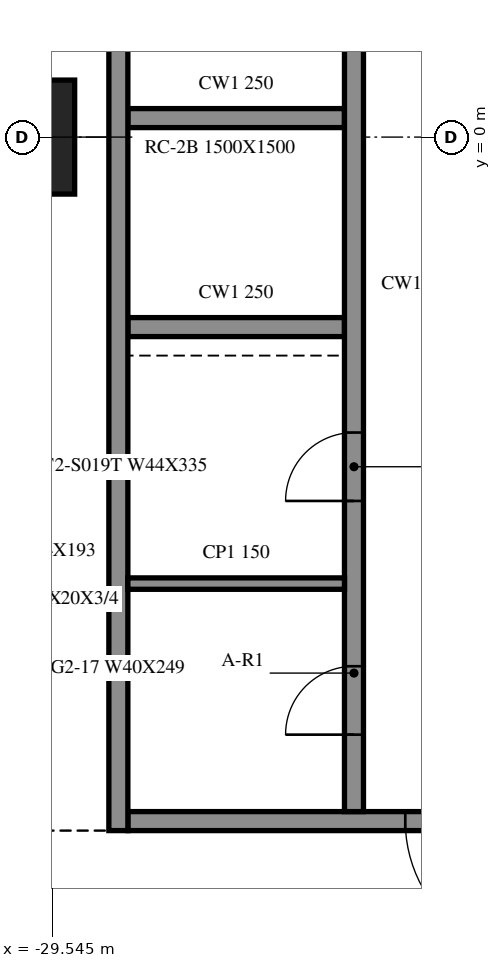
"""IFC4 building model, lengths in metres.
Left out: names, types, materials, properties, quantities, classifications, styles, units other than length and angle.
Written with IfcOpenShell. Run it as: python <this file> out.ifc"""

import sys

from ifc_helpers import new_model, si_unit, direction, frame, frame_2d, origin, origin_2d, place, context, subcontext, project, spatial, rectangle, extrude, element, fill, save


model = new_model("IFC4")
c1 = context("Model", 3, precision=1e-05, world=origin(), true_north=direction((0.0, 1.0)))
c2 = subcontext(c1, "Body", "Model", "MODEL_VIEW")
j1 = project(units=[si_unit("LENGTHUNIT", "METRE"), si_unit("PLANEANGLEUNIT", "RADIAN")], contexts=[c1])
p1 = place(None, origin())
s1 = spatial("IfcSite", under=j1, at=p1, CompositionType="ELEMENT")
p2 = place(p1, origin())
s2 = spatial("IfcBuilding", under=s1, at=p2, CompositionType="ELEMENT")
p3 = place(p2, frame((0.0, 0.0, 80.4)))
s3 = spatial("IfcBuildingStorey", under=s2, at=p3, CompositionType="ELEMENT", Elevation=80.4)
p4 = place(p3, frame((-30.0, 0.0, -0.55), z_axis=(0.0, 0.0, 1.0), x_axis=(1.0, 0.0, 0.0)))
e1 = element("IfcColumn", 1, at=p4, inside=s3, PredefinedType="COLUMN", context=c2, shape_type="SweptSolid", body=[
    extrude(rectangle(XDim=1.5, YDim=1.5, at=origin_2d()), origin(), (0.0, 0.0, 1.0), 4.61),
])
p5 = place(p3, frame((-28.675, 15.125, 0.0), z_axis=(0.0, 0.0, 1.0), x_axis=(0.0, -1.0, 0.0)))
e2 = element("IfcWall", 2, at=p5, inside=s3, PredefinedType="SOLIDWALL", context=c2, shape_type="SweptSolid", body=[
    extrude(rectangle(XDim=24.25, YDim=0.25, at=frame_2d((12.125, 0.0))), origin(), (0.0, 0.0, 1.0), 4.06),
])
p6 = place(p3, frame((-19.45, -9.0, 0.0), z_axis=(0.0, 0.0, 1.0), x_axis=(-1.0, 0.0, 0.0)))
e3 = element("IfcWall", 3, at=p6, inside=s3, PredefinedType="SOLIDWALL", context=c2, shape_type="SweptSolid", body=[
    extrude(rectangle(XDim=9.1, YDim=0.25, at=frame_2d((4.55, 0.0))), origin(), (0.0, 0.0, 1.0), 4.06),
])
p7 = place(p6, frame((3.65, 0.0, 0.0)))
e4 = element("IfcOpeningElement", 4, at=p7, cuts=e3, PredefinedType="OPENING", context=c2, shape_type="SweptSolid", body=[
    extrude(rectangle(XDim=1.8, YDim=2.1, at=frame_2d((0.9, 1.05))), frame((0.0, 0.135, 0.0), z_axis=(0.0, -1.0, 0.0), x_axis=(1.0, 0.0, 0.0)), (0.0, 0.0, 1.0), 0.27),
])
p8 = place(p3, frame((-25.575, -8.875, 0.0), z_axis=(0.0, 0.0, 1.0), x_axis=(0.0, 1.0, 0.0)))
e5 = element("IfcWall", 5, at=p8, inside=s3, PredefinedType="SOLIDWALL", context=c2, shape_type="SweptSolid", body=[
    extrude(rectangle(XDim=17.5, YDim=0.25, at=frame_2d((8.75, 0.0))), origin(), (0.0, 0.0, 1.0), 4.06),
])
p9 = place(p8, frame((1.012, 0.0, 0.0)))
e6 = element("IfcOpeningElement", 6, at=p9, cuts=e5, PredefinedType="OPENING", context=c2, shape_type="SweptSolid", body=[
    extrude(rectangle(XDim=0.9, YDim=2.1, at=frame_2d((0.45, 1.05))), frame((0.0, 0.135, 0.0), z_axis=(0.0, -1.0, 0.0), x_axis=(1.0, 0.0, 0.0)), (0.0, 0.0, 1.0), 0.27),
])
p10 = place(p8, frame((4.087, 0.0, 0.0)))
e7 = element("IfcOpeningElement", 7, at=p10, cuts=e5, PredefinedType="OPENING", context=c2, shape_type="SweptSolid", body=[
    extrude(rectangle(XDim=0.9, YDim=2.1, at=frame_2d((0.45, 1.05))), frame((0.0, 0.135, 0.0), z_axis=(0.0, -1.0, 0.0), x_axis=(1.0, 0.0, 0.0)), (0.0, 0.0, 1.0), 0.27),
])
for number, where, z_axis, x_axis in (
    (8, (-28.55, -2.5, 0.0), (0.0, 0.0, 1.0), (1.0, 0.0, 0.0)),
    (9, (-28.55, 0.25, 0.0), (0.0, 0.0, 1.0), (1.0, 0.0, 0.0)),
):
    element("IfcWall", number, at=place(p3, frame(where, z_axis=z_axis, x_axis=x_axis)), inside=s3, PredefinedType="SOLIDWALL", context=c2, shape_type="SweptSolid", body=[
        extrude(rectangle(XDim=2.85, YDim=0.25, at=frame_2d((1.425, 0.0))), origin(), (0.0, 0.0, 1.0), 4.06),
    ])
p11 = place(p3, frame((-28.55, -5.875, 0.0), z_axis=(0.0, 0.0, 1.0), x_axis=(1.0, 0.0, 0.0)))
e10 = element("IfcWall", 10, at=p11, inside=s3, PredefinedType="PARTITIONING", context=c2, shape_type="SweptSolid", body=[
    extrude(rectangle(XDim=2.85, YDim=0.15, at=frame_2d((1.425, 0.0))), origin(), (0.0, 0.0, 1.0), 4.06),
])
p12 = place(p7, origin())
e11 = element("IfcDoor", 11, at=p12, inside=s3, OperationType="DOUBLE_DOOR_SINGLE_SWING", PredefinedType="DOOR", context=c2, shape_type="SweptSolid", body=[
    extrude(rectangle(XDim=1.8, YDim=2.1, at=frame_2d((0.9, 1.05))), frame((0.0, 0.025, 0.0), z_axis=(0.0, -1.0, 0.0), x_axis=(1.0, 0.0, 0.0)), (0.0, 0.0, 1.0), 0.05),
])
fill(e4, e11)
p13 = place(p9, origin())
e12 = element("IfcDoor", 12, at=p13, inside=s3, OperationType="SINGLE_SWING_LEFT", PredefinedType="DOOR", context=c2, shape_type="SweptSolid", body=[
    extrude(rectangle(XDim=0.9, YDim=2.1, at=frame_2d((0.45, 1.05))), frame((0.0, 0.025, 0.0), z_axis=(0.0, -1.0, 0.0), x_axis=(1.0, 0.0, 0.0)), (0.0, 0.0, 1.0), 0.05),
])
fill(e6, e12)
p14 = place(p10, origin())
e13 = element("IfcDoor", 13, at=p14, inside=s3, OperationType="SINGLE_SWING_RIGHT", PredefinedType="DOOR", context=c2, shape_type="SweptSolid", body=[
    extrude(rectangle(XDim=0.9, YDim=2.1, at=frame_2d((0.45, 1.05))), frame((0.0, 0.025, 0.0), z_axis=(0.0, -1.0, 0.0), x_axis=(1.0, 0.0, 0.0)), (0.0, 0.0, 1.0), 0.05),
])
fill(e7, e13)
save(model, sys.argv[1])
